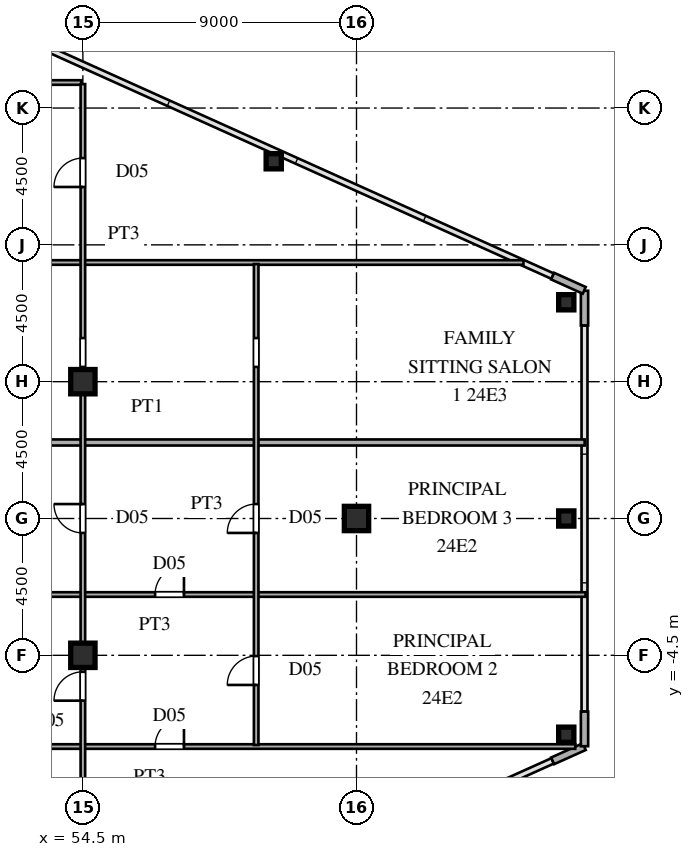
"""IFC4 building model, lengths in metres.
Left out: names, types, materials, properties, quantities, classifications, styles, units other than length and angle.
Written with IfcOpenShell. Run it as: python <this file> out.ifc"""

import sys

from ifc_helpers import new_model, si_unit, direction, frame, frame_2d, origin, origin_2d, place, context, subcontext, project, spatial, rectangle, hollow_rectangle, i_section, extrude, source, transform, mapped, element, fill, save


model = new_model("IFC4")
c1 = context("Model", 3, precision=1e-05, world=origin(), true_north=direction((0.0, 1.0)))
c2 = subcontext(c1, "Body", "Model", "MODEL_VIEW")
j1 = project(units=[si_unit("LENGTHUNIT", "METRE"), si_unit("PLANEANGLEUNIT", "RADIAN")], contexts=[c1])
p1 = place(None, origin())
s1 = spatial("IfcSite", under=j1, at=p1, CompositionType="ELEMENT")
p2 = place(p1, origin())
s2 = spatial("IfcBuilding", under=s1, at=p2, CompositionType="ELEMENT")
p3 = place(p2, frame((0.0, 0.0, 92.4)))
s3 = spatial("IfcBuildingStorey", under=s2, at=p3, CompositionType="ELEMENT", Elevation=92.4)
m1 = source(origin(), c2, "Body", "SweptSolid", [
    extrude(i_section(OverallWidth=0.8, OverallDepth=0.8, WebThickness=0.032, FlangeThickness=0.05, at=origin_2d()), origin(), (0.0, 0.0, 1.0), 3.6),
])
for number, where, z_axis, x_axis in (
    (1, (54.5, -4.5, 0.0), (0.0, 0.0, 1.0), (1.0, 0.0, 0.0)),
    (2, (54.5, 4.5, 0.0), (0.0, 0.0, 1.0), (1.0, 0.0, 0.0)),
    (3, (63.5, 0.0, 0.0), (0.0, 0.0, 1.0), (1.0, 0.0, 0.0)),
):
    element("IfcColumn", number, at=place(p3, frame(where, z_axis=z_axis, x_axis=x_axis)), inside=s3, PredefinedType="COLUMN", context=c2, shape_type="MappedRepresentation", body=[
        mapped(m1, transform((0.0, 0.0, 0.0), scale=1.0)),
    ])
m2 = source(origin(), c2, "Body", "SweptSolid", [
    extrude(hollow_rectangle(XDim=0.5, YDim=0.5, WallThickness=0.02, at=origin_2d()), origin(), (0.0, 0.0, 1.0), 3.6),
])
for number, where, z_axis, x_axis in (
    (4, (70.4, -7.112, 0.0), (0.0, 0.0, 1.0), (1.0, 0.0, 0.0)),
    (5, (70.4, 7.112, 0.0), (0.0, 0.0, 1.0), (1.0, 0.0, 0.0)),
    (6, (60.778, 11.749, 0.0), (0.0, 0.0, 1.0), (1.0, 0.0, 0.0)),
    (7, (70.4, 0.0, 0.0), (0.0, 0.0, 1.0), (1.0, 0.0, 0.0)),
):
    element("IfcColumn", number, at=place(p3, frame(where, z_axis=z_axis, x_axis=x_axis)), inside=s3, PredefinedType="COLUMN", context=c2, shape_type="MappedRepresentation", body=[
        mapped(m2, transform((0.0, 0.0, 0.0), scale=1.0)),
    ])
for number, where, z_axis, x_axis in (
    (8, (69.951, -7.972, 0.0), (0.0, 0.0, 1.0), (0.912, 0.41, 0.0)),
    (9, (71.0, -7.49, 0.0), (0.0, 0.0, 1.0), (0.0, 1.0, 0.0)),
    (10, (71.0, 6.35, 0.0), (0.0, 0.0, 1.0), (0.0, 1.0, 0.0)),
    (11, (70.991, 7.504, 0.0), (0.0, 0.0, 1.0), (-0.912, 0.41, 0.0)),
):
    element("IfcWall", number, at=place(p3, frame(where, z_axis=z_axis, x_axis=x_axis)), inside=s3, PredefinedType="SOLIDWALL", context=c2, shape_type="SweptSolid", body=[
        extrude(rectangle(XDim=1.14, YDim=0.24, at=frame_2d((0.57, 0.0))), origin(), (0.0, 0.0, 1.0), 3.38),
    ])
p4 = place(p3, frame((42.7, -7.5, 0.0), z_axis=(0.0, 0.0, 1.0), x_axis=(1.0, 0.0, 0.0)))
e12 = element("IfcWall", 12, at=p4, inside=s3, PredefinedType="PARTITIONING", context=c2, shape_type="SweptSolid", body=[
    extrude(rectangle(XDim=27.995, YDim=0.15, at=frame_2d((13.998, 0.0))), origin(), (0.0, 0.0, 1.0), 3.38),
])
p5 = place(p4, frame((2.438, 0.0, 0.0)))
e13 = element("IfcOpeningElement", 13, at=p5, cuts=e12, PredefinedType="OPENING", context=c2, shape_type="SweptSolid", body=[
    extrude(rectangle(XDim=0.95, YDim=2.15, at=frame_2d((0.475, 1.075))), frame((0.0, 0.085, 0.0), z_axis=(0.0, -1.0, 0.0), x_axis=(1.0, 0.0, 0.0)), (0.0, 0.0, 1.0), 0.17),
])
p6 = place(p4, frame((14.175, 0.0, 0.0)))
e14 = element("IfcOpeningElement", 14, at=p6, cuts=e12, PredefinedType="OPENING", context=c2, shape_type="SweptSolid", body=[
    extrude(rectangle(XDim=0.95, YDim=2.15, at=frame_2d((0.475, 1.075))), frame((0.0, 0.085, 0.0), z_axis=(0.0, -1.0, 0.0), x_axis=(1.0, 0.0, 0.0)), (0.0, 0.0, 1.0), 0.17),
])
p7 = place(p3, frame((42.7, -2.5, 0.0), z_axis=(0.0, 0.0, 1.0), x_axis=(1.0, 0.0, 0.0)))
e15 = element("IfcWall", 15, at=p7, inside=s3, PredefinedType="PARTITIONING", context=c2, shape_type="SweptSolid", body=[
    extrude(rectangle(XDim=28.335, YDim=0.15, at=frame_2d((14.167, 0.0))), origin(), (0.0, 0.0, 1.0), 3.38),
])
p8 = place(p7, frame((2.438, 0.0, 0.0)))
e16 = element("IfcOpeningElement", 16, at=p8, cuts=e15, PredefinedType="OPENING", context=c2, shape_type="SweptSolid", body=[
    extrude(rectangle(XDim=0.95, YDim=2.15, at=frame_2d((0.475, 1.075))), frame((0.0, 0.085, 0.0), z_axis=(0.0, -1.0, 0.0), x_axis=(1.0, 0.0, 0.0)), (0.0, 0.0, 1.0), 0.17),
])
p9 = place(p7, frame((14.175, 0.0, 0.0)))
e17 = element("IfcOpeningElement", 17, at=p9, cuts=e15, PredefinedType="OPENING", context=c2, shape_type="SweptSolid", body=[
    extrude(rectangle(XDim=0.95, YDim=2.15, at=frame_2d((0.475, 1.075))), frame((0.0, 0.085, 0.0), z_axis=(0.0, -1.0, 0.0), x_axis=(1.0, 0.0, 0.0)), (0.0, 0.0, 1.0), 0.17),
])
p10 = place(p3, frame((39.93, 2.5, 0.0), z_axis=(0.0, 0.0, 1.0), x_axis=(1.0, 0.0, 0.0)))
e18 = element("IfcWall", 18, at=p10, inside=s3, PredefinedType="PARTITIONING", context=c2, shape_type="SweptSolid", body=[
    extrude(rectangle(XDim=31.075, YDim=0.2, at=frame_2d((15.538, 0.0))), origin(), (0.0, 0.0, 1.0), 3.38),
])
p11 = place(p3, frame((42.7, 8.42, 0.0), z_axis=(0.0, 0.0, 1.0), x_axis=(1.0, 0.0, 0.0)))
e19 = element("IfcWall", 19, at=p11, inside=s3, PredefinedType="PARTITIONING", context=c2, shape_type="SweptSolid", body=[
    extrude(rectangle(XDim=26.292, YDim=0.15, at=frame_2d((13.146, 0.0))), origin(), (0.0, 0.0, 1.0), 3.38),
])
p12 = place(p11, frame((2.438, 0.0, 0.0)))
e20 = element("IfcOpeningElement", 20, at=p12, cuts=e19, PredefinedType="OPENING", context=c2, shape_type="SweptSolid", body=[
    extrude(rectangle(XDim=0.95, YDim=2.15, at=frame_2d((0.475, 1.075))), frame((0.0, 0.085, 0.0), z_axis=(0.0, -1.0, 0.0), x_axis=(1.0, 0.0, 0.0)), (0.0, 0.0, 1.0), 0.17),
])
p13 = place(p3, frame((42.7, 14.34, 0.0), z_axis=(0.0, 0.0, 1.0), x_axis=(1.0, 0.0, 0.0)))
e21 = element("IfcWall", 21, at=p13, inside=s3, PredefinedType="PARTITIONING", context=c2, shape_type="SweptSolid", body=[
    extrude(rectangle(XDim=11.75, YDim=0.15, at=frame_2d((5.875, 0.0))), origin(), (0.0, 0.0, 1.0), 3.38),
])
p14 = place(p13, frame((3.255, 0.0, 0.0)))
e22 = element("IfcOpeningElement", 22, at=p14, cuts=e21, PredefinedType="OPENING", context=c2, shape_type="SweptSolid", body=[
    extrude(rectangle(XDim=0.95, YDim=2.15, at=frame_2d((0.475, 1.075))), frame((0.0, 0.085, 0.0), z_axis=(0.0, -1.0, 0.0), x_axis=(1.0, 0.0, 0.0)), (0.0, 0.0, 1.0), 0.17),
])
p15 = place(p3, frame((54.5, -12.45, 0.0), z_axis=(0.0, 0.0, 1.0), x_axis=(0.0, 1.0, 0.0)))
e23 = element("IfcWall", 23, at=p15, inside=s3, PredefinedType="PARTITIONING", context=c2, shape_type="SweptSolid", body=[
    extrude(rectangle(XDim=26.738, YDim=0.15, at=frame_2d((13.369, 0.0))), origin(), (0.0, 0.0, 1.0), 2.68),
])
p16 = place(p15, frame((6.458, 0.0, 0.0)))
e24 = element("IfcOpeningElement", 24, at=p16, cuts=e23, PredefinedType="OPENING", context=c2, shape_type="SweptSolid", body=[
    extrude(rectangle(XDim=0.95, YDim=2.15, at=frame_2d((0.475, 1.075))), frame((0.0, 0.085, 0.0), z_axis=(0.0, -1.0, 0.0), x_axis=(1.0, 0.0, 0.0)), (0.0, 0.0, 1.0), 0.17),
])
p17 = place(p15, frame((11.975, 0.0, 0.0)))
e25 = element("IfcOpeningElement", 25, at=p17, cuts=e23, PredefinedType="OPENING", context=c2, shape_type="SweptSolid", body=[
    extrude(rectangle(XDim=0.95, YDim=2.15, at=frame_2d((0.475, 1.075))), frame((0.0, 0.085, 0.0), z_axis=(0.0, -1.0, 0.0), x_axis=(1.0, 0.0, 0.0)), (0.0, 0.0, 1.0), 0.17),
])
p18 = place(p15, frame((23.354, 0.0, 0.0)))
e26 = element("IfcOpeningElement", 26, at=p18, cuts=e23, PredefinedType="OPENING", context=c2, shape_type="SweptSolid", body=[
    extrude(rectangle(XDim=0.95, YDim=2.15, at=frame_2d((0.475, 1.075))), frame((0.0, 0.085, 0.0), z_axis=(0.0, -1.0, 0.0), x_axis=(1.0, 0.0, 0.0)), (0.0, 0.0, 1.0), 0.17),
])
p19 = place(p15, frame((17.435, 0.0, 0.0)))
e27 = element("IfcOpeningElement", 27, at=p19, cuts=e23, PredefinedType="OPENING", context=c2, shape_type="SweptSolid", body=[
    extrude(rectangle(XDim=0.95, YDim=2.15, at=frame_2d((0.475, 1.075))), frame((0.0, 0.085, 0.0), z_axis=(0.0, -1.0, 0.0), x_axis=(1.0, 0.0, 0.0)), (0.0, 0.0, 1.0), 0.17),
])
p20 = place(p3, frame((60.2, -7.45, 0.0), z_axis=(0.0, 0.0, 1.0), x_axis=(0.0, 1.0, 0.0)))
e28 = element("IfcWall", 28, at=p20, inside=s3, PredefinedType="PARTITIONING", context=c2, shape_type="SweptSolid", body=[
    extrude(rectangle(XDim=15.819, YDim=0.15, at=frame_2d((7.909, 0.0))), origin(), (0.0, 0.0, 1.0), 3.38),
])
p21 = place(p20, frame((1.975, 0.0, 0.0)))
e29 = element("IfcOpeningElement", 29, at=p21, cuts=e28, PredefinedType="OPENING", context=c2, shape_type="SweptSolid", body=[
    extrude(rectangle(XDim=0.95, YDim=2.15, at=frame_2d((0.475, 1.075))), frame((0.0, 0.085, 0.0), z_axis=(0.0, -1.0, 0.0), x_axis=(1.0, 0.0, 0.0)), (0.0, 0.0, 1.0), 0.17),
])
p22 = place(p20, frame((6.975, 0.0, 0.0)))
e30 = element("IfcOpeningElement", 30, at=p22, cuts=e28, PredefinedType="OPENING", context=c2, shape_type="SweptSolid", body=[
    extrude(rectangle(XDim=0.95, YDim=2.15, at=frame_2d((0.475, 1.075))), frame((0.0, 0.085, 0.0), z_axis=(0.0, -1.0, 0.0), x_axis=(1.0, 0.0, 0.0)), (0.0, 0.0, 1.0), 0.17),
])
p23 = place(p20, frame((12.435, 0.0, 0.0)))
e31 = element("IfcOpeningElement", 31, at=p23, cuts=e28, PredefinedType="OPENING", context=c2, shape_type="SweptSolid", body=[
    extrude(rectangle(XDim=0.95, YDim=2.15, at=frame_2d((0.475, 1.075))), frame((0.0, 0.085, 0.0), z_axis=(0.0, -1.0, 0.0), x_axis=(1.0, 0.0, 0.0)), (0.0, 0.0, 1.0), 0.17),
])
m3 = source(origin(), c2, "Body", "SweptSolid", [
    extrude(rectangle(XDim=0.95, YDim=2.15, at=frame_2d((0.475, 1.075))), frame((0.0, 0.025, 0.0), z_axis=(0.0, -1.0, 0.0), x_axis=(1.0, 0.0, 0.0)), (0.0, 0.0, 1.0), 0.05),
])
p24 = place(p6, origin())
e32 = element("IfcDoor", 32, at=p24, inside=s3, OperationType="SINGLE_SWING_RIGHT", PredefinedType="DOOR", context=c2, shape_type="MappedRepresentation", body=[
    mapped(m3, transform((0.0, 0.0, 0.0), scale=1.0)),
])
fill(e14, e32)
p25 = place(p9, origin())
e33 = element("IfcDoor", 33, at=p25, inside=s3, OperationType="SINGLE_SWING_RIGHT", PredefinedType="DOOR", context=c2, shape_type="MappedRepresentation", body=[
    mapped(m3, transform((0.0, 0.0, 0.0), scale=1.0)),
])
fill(e17, e33)
p26 = place(p16, origin())
e34 = element("IfcDoor", 34, at=p26, inside=s3, OperationType="SINGLE_SWING_LEFT", PredefinedType="DOOR", context=c2, shape_type="MappedRepresentation", body=[
    mapped(m3, transform((0.0, 0.0, 0.0), scale=1.0)),
])
fill(e24, e34)
p27 = place(p17, origin())
e35 = element("IfcDoor", 35, at=p27, inside=s3, OperationType="SINGLE_SWING_RIGHT", PredefinedType="DOOR", context=c2, shape_type="MappedRepresentation", body=[
    mapped(m3, transform((0.0, 0.0, 0.0), scale=1.0)),
])
fill(e25, e35)
p28 = place(p18, origin())
e36 = element("IfcDoor", 36, at=p28, inside=s3, OperationType="SINGLE_SWING_LEFT", PredefinedType="DOOR", context=c2, shape_type="MappedRepresentation", body=[
    mapped(m3, transform((0.0, 0.0, 0.0), scale=1.0)),
])
fill(e26, e36)
p29 = place(p21, origin())
e37 = element("IfcDoor", 37, at=p29, inside=s3, OperationType="SINGLE_SWING_LEFT", PredefinedType="DOOR", context=c2, shape_type="MappedRepresentation", body=[
    mapped(m3, transform((0.0, 0.0, 0.0), scale=1.0)),
])
fill(e29, e37)
p30 = place(p22, origin())
e38 = element("IfcDoor", 38, at=p30, inside=s3, OperationType="SINGLE_SWING_LEFT", PredefinedType="DOOR", context=c2, shape_type="MappedRepresentation", body=[
    mapped(m3, transform((0.0, 0.0, 0.0), scale=1.0)),
])
fill(e30, e38)
save(model, sys.argv[1])
